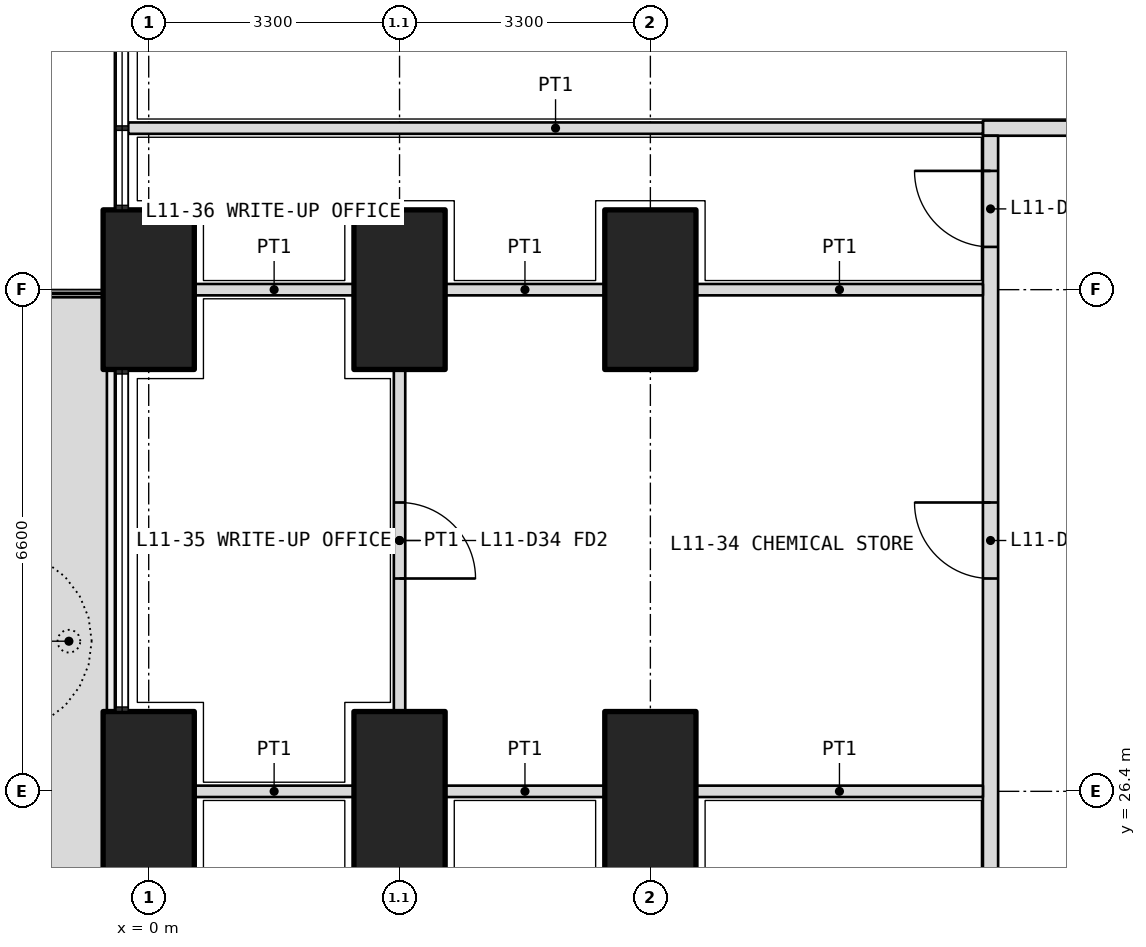
"""IFC4 building model, lengths in metres.
Left out: names, types, materials, properties, quantities, classifications, styles, units other than length and angle.
Written with IfcOpenShell. Run it as: python <this file> out.ifc"""

import sys

from ifc_helpers import new_model, si_unit, direction, frame, frame_2d, origin, origin_2d, place, context, subcontext, project, spatial, polyline, rectangle, outline, extrude, element, fill, save


model = new_model("IFC4")
c1 = context("Model", 3, precision=1e-05, world=origin(), true_north=direction((0.0, 1.0)))
c2 = subcontext(c1, "Body", "Model", "MODEL_VIEW")
j1 = project(units=[si_unit("LENGTHUNIT", "METRE"), si_unit("PLANEANGLEUNIT", "RADIAN")], contexts=[c1])
p1 = place(None, origin())
s1 = spatial("IfcSite", under=j1, at=p1, CompositionType="ELEMENT")
p2 = place(p1, origin())
s2 = spatial("IfcBuilding", under=s1, at=p2, CompositionType="ELEMENT")
p3 = place(p2, frame((0.0, 0.0, 50.7)))
s3 = spatial("IfcBuildingStorey", under=s2, at=p3, CompositionType="ELEMENT", Elevation=50.7)
for number, where, z_axis, x_axis in (
    (1, (0.0, 26.4, 0.0), (0.0, 0.0, 1.0), (0.0, 1.0, 0.0)),
    (2, (0.0, 33.0, 0.0), (0.0, 0.0, 1.0), (0.0, 1.0, 0.0)),
    (3, (3.3, 26.4, 0.0), (0.0, 0.0, 1.0), (0.0, 1.0, 0.0)),
    (4, (3.3, 33.0, 0.0), (0.0, 0.0, 1.0), (0.0, 1.0, 0.0)),
    (5, (6.6, 26.4, 0.0), (0.0, 0.0, 1.0), (0.0, 1.0, 0.0)),
    (6, (6.6, 33.0, 0.0), (0.0, 0.0, 1.0), (0.0, 1.0, 0.0)),
):
    element("IfcColumn", number, at=place(p3, frame(where, z_axis=z_axis, x_axis=x_axis)), inside=s3, PredefinedType="COLUMN", context=c2, shape_type="SweptSolid", body=[
        extrude(rectangle(XDim=2.1, YDim=1.2, at=origin_2d()), origin(), (0.0, 0.0, 1.0), 4.2),
    ])
p4 = place(p3, origin())
e7 = element("IfcWall", 7, at=p4, inside=s3, PredefinedType="USERDEFINED", context=c2, shape_type="SweptSolid", body=[
    extrude(outline(polyline([(-1.55, 23.85), (-0.55, 23.85), (-0.55, 32.9), (-1.55, 32.9), (-1.55, 23.85)]), holes=[polyline([(-1.4, 24.0), (-0.7, 24.0), (-0.7, 32.75), (-1.4, 32.75), (-1.4, 24.0)])]), origin(), (0.0, 0.0, 1.0), 1.05),
])
p5 = place(p3, frame((10.975, 35.125, 0.0), z_axis=(0.0, 0.0, 1.0), x_axis=(1.0, 0.0, 0.0)))
e8 = element("IfcWall", 8, at=p5, inside=s3, PredefinedType="PARTITIONING", context=c2, shape_type="SweptSolid", body=[
    extrude(rectangle(XDim=30.85, YDim=0.2, at=frame_2d((15.425, 0.0))), origin(), (0.0, 0.0, 1.0), 2.85),
])
p6 = place(p5, frame((2.312, 0.0, 0.0)))
e9 = element("IfcOpeningElement", 9, at=p6, cuts=e8, PredefinedType="OPENING", context=c2, shape_type="SweptSolid", body=[
    extrude(rectangle(XDim=1.0, YDim=2.1, at=frame_2d((0.5, 1.05))), frame((0.0, 0.11, 0.0), z_axis=(0.0, -1.0, 0.0), x_axis=(1.0, 0.0, 0.0)), (0.0, 0.0, 1.0), 0.22),
])
p7 = place(p5, frame((11.625, 0.0, 0.0)))
e10 = element("IfcOpeningElement", 10, at=p7, cuts=e8, PredefinedType="OPENING", context=c2, shape_type="SweptSolid", body=[
    extrude(rectangle(XDim=1.0, YDim=2.1, at=frame_2d((0.5, 1.05))), frame((0.0, 0.11, 0.0), z_axis=(0.0, -1.0, 0.0), x_axis=(1.0, 0.0, 0.0)), (0.0, 0.0, 1.0), 0.22),
])
p8 = place(p5, frame((21.525, 0.0, 0.0)))
e11 = element("IfcOpeningElement", 11, at=p8, cuts=e8, PredefinedType="OPENING", context=c2, shape_type="SweptSolid", body=[
    extrude(rectangle(XDim=1.0, YDim=2.1, at=frame_2d((0.5, 1.05))), frame((0.0, 0.11, 0.0), z_axis=(0.0, -1.0, 0.0), x_axis=(1.0, 0.0, 0.0)), (0.0, 0.0, 1.0), 0.22),
])
p9 = place(p5, frame((26.475, 0.0, 0.0)))
e12 = element("IfcOpeningElement", 12, at=p9, cuts=e8, PredefinedType="OPENING", context=c2, shape_type="SweptSolid", body=[
    extrude(rectangle(XDim=1.0, YDim=2.1, at=frame_2d((0.5, 1.05))), frame((0.0, 0.11, 0.0), z_axis=(0.0, -1.0, 0.0), x_axis=(1.0, 0.0, 0.0)), (0.0, 0.0, 1.0), 0.22),
])
p10 = place(p5, frame((29.188, 0.0, 0.0)))
e13 = element("IfcOpeningElement", 13, at=p10, cuts=e8, PredefinedType="OPENING", context=c2, shape_type="SweptSolid", body=[
    extrude(rectangle(XDim=1.0, YDim=2.1, at=frame_2d((0.5, 1.05))), frame((0.0, 0.11, 0.0), z_axis=(0.0, -1.0, 0.0), x_axis=(1.0, 0.0, 0.0)), (0.0, 0.0, 1.0), 0.22),
])
p11 = place(p3, frame((11.075, 11.175, 0.0), z_axis=(0.0, 0.0, 1.0), x_axis=(0.0, 1.0, 0.0)))
e14 = element("IfcWall", 14, at=p11, inside=s3, PredefinedType="PARTITIONING", context=c2, shape_type="SweptSolid", body=[
    extrude(rectangle(XDim=23.85, YDim=0.2, at=frame_2d((11.925, 0.0))), origin(), (0.0, 0.0, 1.0), 2.85),
])
p12 = place(p11, frame((0.462, 0.0, 0.0)))
e15 = element("IfcOpeningElement", 15, at=p12, cuts=e14, PredefinedType="OPENING", context=c2, shape_type="SweptSolid", body=[
    extrude(rectangle(XDim=1.0, YDim=2.1, at=frame_2d((0.5, 1.05))), frame((0.0, 0.11, 0.0), z_axis=(0.0, -1.0, 0.0), x_axis=(1.0, 0.0, 0.0)), (0.0, 0.0, 1.0), 0.22),
])
p13 = place(p11, frame((2.575, 0.0, 0.0)))
e16 = element("IfcOpeningElement", 16, at=p13, cuts=e14, PredefinedType="OPENING", context=c2, shape_type="SweptSolid", body=[
    extrude(rectangle(XDim=1.0, YDim=2.1, at=frame_2d((0.5, 1.05))), frame((0.0, 0.11, 0.0), z_axis=(0.0, -1.0, 0.0), x_axis=(1.0, 0.0, 0.0)), (0.0, 0.0, 1.0), 0.22),
])
p14 = place(p11, frame((5.65, 0.0, 0.0)))
e17 = element("IfcOpeningElement", 17, at=p14, cuts=e14, PredefinedType="OPENING", context=c2, shape_type="SweptSolid", body=[
    extrude(rectangle(XDim=0.9, YDim=2.1, at=frame_2d((0.45, 1.05))), frame((0.0, 0.11, 0.0), z_axis=(0.0, -1.0, 0.0), x_axis=(1.0, 0.0, 0.0)), (0.0, 0.0, 1.0), 0.22),
])
p15 = place(p11, frame((9.5, 0.0, 0.0)))
e18 = element("IfcOpeningElement", 18, at=p15, cuts=e14, PredefinedType="OPENING", context=c2, shape_type="SweptSolid", body=[
    extrude(rectangle(XDim=0.9, YDim=2.1, at=frame_2d((0.45, 1.05))), frame((0.0, 0.11, 0.0), z_axis=(0.0, -1.0, 0.0), x_axis=(1.0, 0.0, 0.0)), (0.0, 0.0, 1.0), 0.22),
])
p16 = place(p11, frame((13.025, 0.0, 0.0)))
e19 = element("IfcOpeningElement", 19, at=p16, cuts=e14, PredefinedType="OPENING", context=c2, shape_type="SweptSolid", body=[
    extrude(rectangle(XDim=1.0, YDim=2.1, at=frame_2d((0.5, 1.05))), frame((0.0, 0.11, 0.0), z_axis=(0.0, -1.0, 0.0), x_axis=(1.0, 0.0, 0.0)), (0.0, 0.0, 1.0), 0.22),
])
p17 = place(p11, frame((18.025, 0.0, 0.0)))
e20 = element("IfcOpeningElement", 20, at=p17, cuts=e14, PredefinedType="OPENING", context=c2, shape_type="SweptSolid", body=[
    extrude(rectangle(XDim=1.0, YDim=2.1, at=frame_2d((0.5, 1.05))), frame((0.0, 0.11, 0.0), z_axis=(0.0, -1.0, 0.0), x_axis=(1.0, 0.0, 0.0)), (0.0, 0.0, 1.0), 0.22),
])
p18 = place(p11, frame((22.387, 0.0, 0.0)))
e21 = element("IfcOpeningElement", 21, at=p18, cuts=e14, PredefinedType="OPENING", context=c2, shape_type="SweptSolid", body=[
    extrude(rectangle(XDim=1.0, YDim=2.1, at=frame_2d((0.5, 1.05))), frame((0.0, 0.11, 0.0), z_axis=(0.0, -1.0, 0.0), x_axis=(1.0, 0.0, 0.0)), (0.0, 0.0, 1.0), 0.22),
])
p19 = place(p3, frame((-0.27, 35.125, 0.0), z_axis=(0.0, 0.0, 1.0), x_axis=(1.0, 0.0, 0.0)))
e22 = element("IfcWall", 22, at=p19, inside=s3, PredefinedType="PARTITIONING", context=c2, shape_type="SweptSolid", body=[
    extrude(rectangle(XDim=11.245, YDim=0.15, at=frame_2d((5.623, 0.0))), origin(), (0.0, 0.0, 1.0), 2.7),
])
p20 = place(p3, frame((3.3, 31.95, 0.0), z_axis=(0.0, 0.0, 1.0), x_axis=(0.0, -1.0, 0.0)))
e23 = element("IfcWall", 23, at=p20, inside=s3, PredefinedType="PARTITIONING", context=c2, shape_type="SweptSolid", body=[
    extrude(rectangle(XDim=4.5, YDim=0.15, at=frame_2d((2.25, 0.0))), origin(), (0.0, 0.0, 1.0), 3.9),
])
p21 = place(p20, frame((1.75, 0.0, 0.0)))
e24 = element("IfcOpeningElement", 24, at=p21, cuts=e23, PredefinedType="OPENING", context=c2, shape_type="SweptSolid", body=[
    extrude(rectangle(XDim=1.0, YDim=2.1, at=frame_2d((0.5, 1.05))), frame((0.0, 0.085, 0.0), z_axis=(0.0, -1.0, 0.0), x_axis=(1.0, 0.0, 0.0)), (0.0, 0.0, 1.0), 0.17),
])
p22 = place(p3, frame((0.6, 26.4, 0.0), z_axis=(0.0, 0.0, 1.0), x_axis=(1.0, 0.0, 0.0)))
e25 = element("IfcWall", 25, at=p22, inside=s3, PredefinedType="PARTITIONING", context=c2, shape_type="SweptSolid", body=[
    extrude(rectangle(XDim=2.1, YDim=0.15, at=frame_2d((1.05, 0.0))), origin(), (0.0, 0.0, 1.0), 2.85),
])
p23 = place(p3, frame((3.9, 26.4, 0.0), z_axis=(0.0, 0.0, 1.0), x_axis=(1.0, 0.0, 0.0)))
e26 = element("IfcWall", 26, at=p23, inside=s3, PredefinedType="PARTITIONING", context=c2, shape_type="SweptSolid", body=[
    extrude(rectangle(XDim=2.1, YDim=0.15, at=frame_2d((1.05, 0.0))), origin(), (0.0, 0.0, 1.0), 2.85),
])
p24 = place(p3, frame((7.2, 26.4, 0.0), z_axis=(0.0, 0.0, 1.0), x_axis=(1.0, 0.0, 0.0)))
e27 = element("IfcWall", 27, at=p24, inside=s3, PredefinedType="PARTITIONING", context=c2, shape_type="SweptSolid", body=[
    extrude(rectangle(XDim=3.775, YDim=0.15, at=frame_2d((1.888, 0.0))), origin(), (0.0, 0.0, 1.0), 2.85),
])
p25 = place(p3, frame((0.6, 33.0, 0.0), z_axis=(0.0, 0.0, 1.0), x_axis=(1.0, 0.0, 0.0)))
e28 = element("IfcWall", 28, at=p25, inside=s3, PredefinedType="PARTITIONING", context=c2, shape_type="SweptSolid", body=[
    extrude(rectangle(XDim=2.1, YDim=0.15, at=frame_2d((1.05, 0.0))), origin(), (0.0, 0.0, 1.0), 2.85),
])
p26 = place(p3, frame((3.9, 33.0, 0.0), z_axis=(0.0, 0.0, 1.0), x_axis=(1.0, 0.0, 0.0)))
e29 = element("IfcWall", 29, at=p26, inside=s3, PredefinedType="PARTITIONING", context=c2, shape_type="SweptSolid", body=[
    extrude(rectangle(XDim=2.1, YDim=0.15, at=frame_2d((1.05, 0.0))), origin(), (0.0, 0.0, 1.0), 2.85),
])
p27 = place(p3, frame((7.2, 33.0, 0.0), z_axis=(0.0, 0.0, 1.0), x_axis=(1.0, 0.0, 0.0)))
e30 = element("IfcWall", 30, at=p27, inside=s3, PredefinedType="PARTITIONING", context=c2, shape_type="SweptSolid", body=[
    extrude(rectangle(XDim=3.775, YDim=0.15, at=frame_2d((1.888, 0.0))), origin(), (0.0, 0.0, 1.0), 2.85),
])
p28 = place(p17, origin())
e31 = element("IfcDoor", 31, at=p28, inside=s3, OperationType="SINGLE_SWING_RIGHT", PredefinedType="DOOR", context=c2, shape_type="SweptSolid", body=[
    extrude(rectangle(XDim=1.0, YDim=2.1, at=frame_2d((0.5, 1.05))), frame((0.0, 0.025, 0.0), z_axis=(0.0, -1.0, 0.0), x_axis=(1.0, 0.0, 0.0)), (0.0, 0.0, 1.0), 0.05),
])
fill(e20, e31)
p29 = place(p21, origin())
e32 = element("IfcDoor", 32, at=p29, inside=s3, OperationType="SINGLE_SWING_RIGHT", PredefinedType="DOOR", context=c2, shape_type="SweptSolid", body=[
    extrude(rectangle(XDim=1.0, YDim=2.1, at=frame_2d((0.5, 1.05))), frame((0.0, 0.025, 0.0), z_axis=(0.0, -1.0, 0.0), x_axis=(1.0, 0.0, 0.0)), (0.0, 0.0, 1.0), 0.05),
])
fill(e24, e32)
p30 = place(p18, origin())
e33 = element("IfcDoor", 33, at=p30, inside=s3, OperationType="SINGLE_SWING_RIGHT", PredefinedType="DOOR", context=c2, shape_type="SweptSolid", body=[
    extrude(rectangle(XDim=1.0, YDim=2.1, at=frame_2d((0.5, 1.05))), frame((0.0, 0.025, 0.0), z_axis=(0.0, -1.0, 0.0), x_axis=(1.0, 0.0, 0.0)), (0.0, 0.0, 1.0), 0.05),
])
fill(e21, e33)
save(model, sys.argv[1])
